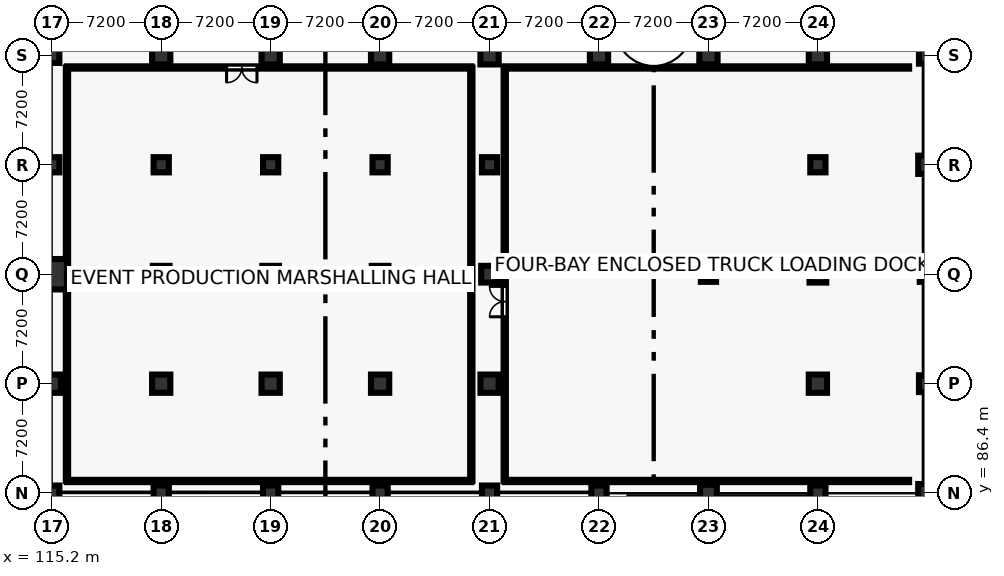
"""IFC4 building model, lengths in metres.
Left out: names, types, materials, properties, quantities, classifications, styles, units other than length and angle.
Written with IfcOpenShell. Run it as: python <this file> out.ifc"""

import sys

from ifc_helpers import new_model, si_unit, direction, frame, frame_2d, origin, origin_2d, place, context, subcontext, project, spatial, rectangle, circle, extrude, element, fill, save


model = new_model("IFC4")
c1 = context("Model", 3, precision=1e-05, world=origin(), true_north=direction((0.0, 1.0)))
c2 = subcontext(c1, "Body", "Model", "MODEL_VIEW")
j1 = project(units=[si_unit("LENGTHUNIT", "METRE"), si_unit("PLANEANGLEUNIT", "RADIAN")], contexts=[c1])
p1 = place(None, origin())
s1 = spatial("IfcSite", under=j1, at=p1, CompositionType="ELEMENT")
p2 = place(p1, origin())
s2 = spatial("IfcBuilding", under=s1, at=p2, CompositionType="ELEMENT")
p3 = place(p2, frame((0.0, 0.0, -5.4)))
s3 = spatial("IfcBuildingStorey", under=s2, at=p3, CompositionType="ELEMENT", Elevation=-5.4)
p4 = place(p3, frame((115.2, 86.4, 0.0), z_axis=(0.0, 0.0, 1.0), x_axis=(1.0, 0.0, 0.0)))
e1 = element("IfcColumn", 1, at=p4, inside=s3, PredefinedType="COLUMN", context=c2, shape_type="SweptSolid", body=[
    extrude(circle(Radius=0.5, at=origin_2d()), origin(), (0.0, 0.0, 1.0), 5.4),
])
p5 = place(p3, frame((115.2, 93.6, 0.0), z_axis=(0.0, 0.0, 1.0), x_axis=(1.0, 0.0, 0.0)))
e2 = element("IfcColumn", 2, at=p5, inside=s3, PredefinedType="COLUMN", context=c2, shape_type="SweptSolid", body=[
    extrude(circle(Radius=0.6, at=origin_2d()), origin(), (0.0, 0.0, 1.0), 5.4),
])
p6 = place(p3, frame((115.2, 100.8, 0.0), z_axis=(0.0, 0.0, 1.0), x_axis=(1.0, 0.0, 0.0)))
e3 = element("IfcColumn", 3, at=p6, inside=s3, PredefinedType="COLUMN", context=c2, shape_type="SweptSolid", body=[
    extrude(circle(Radius=1.0, at=origin_2d()), origin(), (0.0, 0.0, 1.0), 5.4),
])
p7 = place(p3, frame((115.2, 108.0, 0.0), z_axis=(0.0, 0.0, 1.0), x_axis=(1.0, 0.0, 0.0)))
e4 = element("IfcColumn", 4, at=p7, inside=s3, PredefinedType="COLUMN", context=c2, shape_type="SweptSolid", body=[
    extrude(rectangle(XDim=1.0, YDim=1.0, at=origin_2d()), origin(), (0.0, 0.0, 1.0), 5.4),
])
p8 = place(p3, frame((115.2, 115.2, 0.0), z_axis=(0.0, 0.0, 1.0), x_axis=(1.0, 0.0, 0.0)))
e5 = element("IfcColumn", 5, at=p8, inside=s3, PredefinedType="COLUMN", context=c2, shape_type="SweptSolid", body=[
    extrude(circle(Radius=0.5, at=origin_2d()), origin(), (0.0, 0.0, 1.0), 5.4),
])
p9 = place(p3, frame((122.4, 86.4, 0.0), z_axis=(0.0, 0.0, 1.0), x_axis=(1.0, 0.0, 0.0)))
e6 = element("IfcColumn", 6, at=p9, inside=s3, PredefinedType="COLUMN", context=c2, shape_type="SweptSolid", body=[
    extrude(rectangle(XDim=1.0, YDim=1.0, at=origin_2d()), origin(), (0.0, 0.0, 1.0), 5.4),
])
p10 = place(p3, frame((122.4, 93.6, 0.0), z_axis=(0.0, 0.0, 1.0), x_axis=(1.0, 0.0, 0.0)))
e7 = element("IfcColumn", 7, at=p10, inside=s3, PredefinedType="COLUMN", context=c2, shape_type="SweptSolid", body=[
    extrude(circle(Radius=0.6, at=origin_2d()), origin(), (0.0, 0.0, 1.0), 5.4),
])
p11 = place(p3, frame((122.4, 100.8, 0.0), z_axis=(0.0, 0.0, 1.0), x_axis=(1.0, 0.0, 0.0)))
e8 = element("IfcColumn", 8, at=p11, inside=s3, PredefinedType="COLUMN", context=c2, shape_type="SweptSolid", body=[
    extrude(rectangle(XDim=1.1, YDim=1.1, at=origin_2d()), origin(), (0.0, 0.0, 1.0), 5.4),
])
p12 = place(p3, frame((122.4, 108.0, 0.0), z_axis=(0.0, 0.0, 1.0), x_axis=(1.0, 0.0, 0.0)))
e9 = element("IfcColumn", 9, at=p12, inside=s3, PredefinedType="COLUMN", context=c2, shape_type="SweptSolid", body=[
    extrude(rectangle(XDim=1.0, YDim=1.0, at=origin_2d()), origin(), (0.0, 0.0, 1.0), 5.4),
])
p13 = place(p3, frame((122.4, 115.2, 0.0), z_axis=(0.0, 0.0, 1.0), x_axis=(1.0, 0.0, 0.0)))
e10 = element("IfcColumn", 10, at=p13, inside=s3, PredefinedType="COLUMN", context=c2, shape_type="SweptSolid", body=[
    extrude(circle(Radius=0.6, at=origin_2d()), origin(), (0.0, 0.0, 1.0), 5.4),
])
p14 = place(p3, frame((129.6, 86.4, 0.0), z_axis=(0.0, 0.0, 1.0), x_axis=(1.0, 0.0, 0.0)))
e11 = element("IfcColumn", 11, at=p14, inside=s3, PredefinedType="COLUMN", context=c2, shape_type="SweptSolid", body=[
    extrude(rectangle(XDim=1.0, YDim=1.0, at=origin_2d()), origin(), (0.0, 0.0, 1.0), 5.4),
])
p15 = place(p3, frame((129.6, 93.6, 0.0), z_axis=(0.0, 0.0, 1.0), x_axis=(1.0, 0.0, 0.0)))
e12 = element("IfcColumn", 12, at=p15, inside=s3, PredefinedType="COLUMN", context=c2, shape_type="SweptSolid", body=[
    extrude(circle(Radius=0.6, at=origin_2d()), origin(), (0.0, 0.0, 1.0), 5.4),
])
p16 = place(p3, frame((129.6, 100.8, 0.0), z_axis=(0.0, 0.0, 1.0), x_axis=(1.0, 0.0, 0.0)))
e13 = element("IfcColumn", 13, at=p16, inside=s3, PredefinedType="COLUMN", context=c2, shape_type="SweptSolid", body=[
    extrude(rectangle(XDim=1.1, YDim=1.1, at=origin_2d()), origin(), (0.0, 0.0, 1.0), 5.4),
])
p17 = place(p3, frame((129.6, 108.0, 0.0), z_axis=(0.0, 0.0, 1.0), x_axis=(1.0, 0.0, 0.0)))
e14 = element("IfcColumn", 14, at=p17, inside=s3, PredefinedType="COLUMN", context=c2, shape_type="SweptSolid", body=[
    extrude(rectangle(XDim=1.0, YDim=1.0, at=origin_2d()), origin(), (0.0, 0.0, 1.0), 5.4),
])
p18 = place(p3, frame((129.6, 115.2, 0.0), z_axis=(0.0, 0.0, 1.0), x_axis=(1.0, 0.0, 0.0)))
e15 = element("IfcColumn", 15, at=p18, inside=s3, PredefinedType="COLUMN", context=c2, shape_type="SweptSolid", body=[
    extrude(circle(Radius=0.6, at=origin_2d()), origin(), (0.0, 0.0, 1.0), 5.4),
])
p19 = place(p3, frame((136.8, 86.4, 0.0), z_axis=(0.0, 0.0, 1.0), x_axis=(1.0, 0.0, 0.0)))
e16 = element("IfcColumn", 16, at=p19, inside=s3, PredefinedType="COLUMN", context=c2, shape_type="SweptSolid", body=[
    extrude(rectangle(XDim=1.0, YDim=1.0, at=origin_2d()), origin(), (0.0, 0.0, 1.0), 5.4),
])
p20 = place(p3, frame((136.8, 93.6, 0.0), z_axis=(0.0, 0.0, 1.0), x_axis=(1.0, 0.0, 0.0)))
e17 = element("IfcColumn", 17, at=p20, inside=s3, PredefinedType="COLUMN", context=c2, shape_type="SweptSolid", body=[
    extrude(circle(Radius=0.6, at=origin_2d()), origin(), (0.0, 0.0, 1.0), 5.4),
])
p21 = place(p3, frame((136.8, 100.8, 0.0), z_axis=(0.0, 0.0, 1.0), x_axis=(1.0, 0.0, 0.0)))
e18 = element("IfcColumn", 18, at=p21, inside=s3, PredefinedType="COLUMN", context=c2, shape_type="SweptSolid", body=[
    extrude(rectangle(XDim=1.1, YDim=1.1, at=origin_2d()), origin(), (0.0, 0.0, 1.0), 5.4),
])
p22 = place(p3, frame((136.8, 108.0, 0.0), z_axis=(0.0, 0.0, 1.0), x_axis=(1.0, 0.0, 0.0)))
e19 = element("IfcColumn", 19, at=p22, inside=s3, PredefinedType="COLUMN", context=c2, shape_type="SweptSolid", body=[
    extrude(rectangle(XDim=1.0, YDim=1.0, at=origin_2d()), origin(), (0.0, 0.0, 1.0), 5.4),
])
p23 = place(p3, frame((136.8, 115.2, 0.0), z_axis=(0.0, 0.0, 1.0), x_axis=(1.0, 0.0, 0.0)))
e20 = element("IfcColumn", 20, at=p23, inside=s3, PredefinedType="COLUMN", context=c2, shape_type="SweptSolid", body=[
    extrude(circle(Radius=0.6, at=origin_2d()), origin(), (0.0, 0.0, 1.0), 5.4),
])
p24 = place(p3, frame((144.0, 86.4, 0.0), z_axis=(0.0, 0.0, 1.0), x_axis=(1.0, 0.0, 0.0)))
e21 = element("IfcColumn", 21, at=p24, inside=s3, PredefinedType="COLUMN", context=c2, shape_type="SweptSolid", body=[
    extrude(rectangle(XDim=1.0, YDim=1.0, at=origin_2d()), origin(), (0.0, 0.0, 1.0), 5.4),
])
p25 = place(p3, frame((144.0, 93.6, 0.0), z_axis=(0.0, 0.0, 1.0), x_axis=(1.0, 0.0, 0.0)))
e22 = element("IfcColumn", 22, at=p25, inside=s3, PredefinedType="COLUMN", context=c2, shape_type="SweptSolid", body=[
    extrude(circle(Radius=0.6, at=origin_2d()), origin(), (0.0, 0.0, 1.0), 5.4),
])
p26 = place(p3, frame((144.0, 100.8, 0.0), z_axis=(0.0, 0.0, 1.0), x_axis=(1.0, 0.0, 0.0)))
e23 = element("IfcColumn", 23, at=p26, inside=s3, PredefinedType="COLUMN", context=c2, shape_type="SweptSolid", body=[
    extrude(rectangle(XDim=1.1, YDim=1.1, at=origin_2d()), origin(), (0.0, 0.0, 1.0), 5.4),
])
p27 = place(p3, frame((144.0, 108.0, 0.0), z_axis=(0.0, 0.0, 1.0), x_axis=(1.0, 0.0, 0.0)))
e24 = element("IfcColumn", 24, at=p27, inside=s3, PredefinedType="COLUMN", context=c2, shape_type="SweptSolid", body=[
    extrude(rectangle(XDim=1.0, YDim=1.0, at=origin_2d()), origin(), (0.0, 0.0, 1.0), 5.4),
])
p28 = place(p3, frame((144.0, 115.2, 0.0), z_axis=(0.0, 0.0, 1.0), x_axis=(1.0, 0.0, 0.0)))
e25 = element("IfcColumn", 25, at=p28, inside=s3, PredefinedType="COLUMN", context=c2, shape_type="SweptSolid", body=[
    extrude(circle(Radius=0.6, at=origin_2d()), origin(), (0.0, 0.0, 1.0), 5.4),
])
p29 = place(p3, frame((151.2, 86.4, 0.0), z_axis=(0.0, 0.0, 1.0), x_axis=(1.0, 0.0, 0.0)))
e26 = element("IfcColumn", 26, at=p29, inside=s3, PredefinedType="COLUMN", context=c2, shape_type="SweptSolid", body=[
    extrude(rectangle(XDim=1.0, YDim=1.0, at=origin_2d()), origin(), (0.0, 0.0, 1.0), 5.4),
])
p30 = place(p3, frame((151.2, 115.2, 0.0), z_axis=(0.0, 0.0, 1.0), x_axis=(1.0, 0.0, 0.0)))
e27 = element("IfcColumn", 27, at=p30, inside=s3, PredefinedType="COLUMN", context=c2, shape_type="SweptSolid", body=[
    extrude(circle(Radius=0.6, at=origin_2d()), origin(), (0.0, 0.0, 1.0), 5.4),
])
p31 = place(p3, frame((158.4, 86.4, 0.0), z_axis=(0.0, 0.0, 1.0), x_axis=(1.0, 0.0, 0.0)))
e28 = element("IfcColumn", 28, at=p31, inside=s3, PredefinedType="COLUMN", context=c2, shape_type="SweptSolid", body=[
    extrude(rectangle(XDim=1.1, YDim=1.1, at=origin_2d()), origin(), (0.0, 0.0, 1.0), 5.4),
])
p32 = place(p3, frame((158.4, 100.8, 0.0), z_axis=(0.0, 0.0, 1.0), x_axis=(1.0, 0.0, 0.0)))
e29 = element("IfcColumn", 29, at=p32, inside=s3, PredefinedType="COLUMN", context=c2, shape_type="SweptSolid", body=[
    extrude(rectangle(XDim=1.0, YDim=1.0, at=origin_2d()), origin(), (0.0, 0.0, 1.0), 5.4),
])
p33 = place(p3, frame((158.4, 115.2, 0.0), z_axis=(0.0, 0.0, 1.0), x_axis=(1.0, 0.0, 0.0)))
e30 = element("IfcColumn", 30, at=p33, inside=s3, PredefinedType="COLUMN", context=c2, shape_type="SweptSolid", body=[
    extrude(circle(Radius=0.6, at=origin_2d()), origin(), (0.0, 0.0, 1.0), 5.4),
])
p34 = place(p3, frame((165.6, 86.4, 0.0), z_axis=(0.0, 0.0, 1.0), x_axis=(1.0, 0.0, 0.0)))
e31 = element("IfcColumn", 31, at=p34, inside=s3, PredefinedType="COLUMN", context=c2, shape_type="SweptSolid", body=[
    extrude(rectangle(XDim=1.0, YDim=1.0, at=origin_2d()), origin(), (0.0, 0.0, 1.0), 5.4),
])
p35 = place(p3, frame((165.6, 93.6, 0.0), z_axis=(0.0, 0.0, 1.0), x_axis=(1.0, 0.0, 0.0)))
e32 = element("IfcColumn", 32, at=p35, inside=s3, PredefinedType="COLUMN", context=c2, shape_type="SweptSolid", body=[
    extrude(circle(Radius=0.6, at=origin_2d()), origin(), (0.0, 0.0, 1.0), 5.4),
])
p36 = place(p3, frame((165.6, 100.8, 0.0), z_axis=(0.0, 0.0, 1.0), x_axis=(1.0, 0.0, 0.0)))
e33 = element("IfcColumn", 33, at=p36, inside=s3, PredefinedType="COLUMN", context=c2, shape_type="SweptSolid", body=[
    extrude(rectangle(XDim=1.1, YDim=1.1, at=origin_2d()), origin(), (0.0, 0.0, 1.0), 5.4),
])
p37 = place(p3, frame((165.6, 108.0, 0.0), z_axis=(0.0, 0.0, 1.0), x_axis=(1.0, 0.0, 0.0)))
e34 = element("IfcColumn", 34, at=p37, inside=s3, PredefinedType="COLUMN", context=c2, shape_type="SweptSolid", body=[
    extrude(rectangle(XDim=1.0, YDim=1.0, at=origin_2d()), origin(), (0.0, 0.0, 1.0), 5.4),
])
for number, where, z_axis, x_axis in (
    (35, (165.6, 115.2, 0.0), (0.0, 0.0, 1.0), (1.0, 0.0, 0.0)),
    (36, (172.8, 86.4, 0.0), (0.0, 0.0, 1.0), (1.0, 0.0, 0.0)),
):
    element("IfcColumn", number, at=place(p3, frame(where, z_axis=z_axis, x_axis=x_axis)), inside=s3, PredefinedType="COLUMN", context=c2, shape_type="SweptSolid", body=[
        extrude(circle(Radius=0.6, at=origin_2d()), origin(), (0.0, 0.0, 1.0), 5.4),
    ])
p38 = place(p3, frame((172.8, 93.6, 0.0), z_axis=(0.0, 0.0, 1.0), x_axis=(1.0, 0.0, 0.0)))
e37 = element("IfcColumn", 37, at=p38, inside=s3, PredefinedType="COLUMN", context=c2, shape_type="SweptSolid", body=[
    extrude(rectangle(XDim=1.1, YDim=1.1, at=origin_2d()), origin(), (0.0, 0.0, 1.0), 5.4),
])
p39 = place(p3, frame((172.8, 100.8, 0.0), z_axis=(0.0, 0.0, 1.0), x_axis=(1.0, 0.0, 0.0)))
e38 = element("IfcColumn", 38, at=p39, inside=s3, PredefinedType="COLUMN", context=c2, shape_type="SweptSolid", body=[
    extrude(rectangle(XDim=1.0, YDim=1.0, at=origin_2d()), origin(), (0.0, 0.0, 1.0), 5.4),
])
p40 = place(p3, frame((172.8, 108.0, 0.0), z_axis=(0.0, 0.0, 1.0), x_axis=(1.0, 0.0, 0.0)))
e39 = element("IfcColumn", 39, at=p40, inside=s3, PredefinedType="COLUMN", context=c2, shape_type="SweptSolid", body=[
    extrude(circle(Radius=0.6, at=origin_2d()), origin(), (0.0, 0.0, 1.0), 5.4),
])
p41 = place(p3, frame((172.8, 115.2, 0.0), z_axis=(0.0, 0.0, 1.0), x_axis=(1.0, 0.0, 0.0)))
e40 = element("IfcColumn", 40, at=p41, inside=s3, PredefinedType="COLUMN", context=c2, shape_type="SweptSolid", body=[
    extrude(rectangle(XDim=1.1, YDim=1.1, at=origin_2d()), origin(), (0.0, 0.0, 1.0), 5.4),
])
p42 = place(p3, frame((172.8, 43.2, 0.0), z_axis=(0.0, 0.0, 1.0), x_axis=(0.0, 1.0, 0.0)))
e41 = element("IfcWall", 41, at=p42, inside=s3, PredefinedType="USERDEFINED", context=c2, shape_type="SweptSolid", body=[
    extrude(rectangle(XDim=43.2, YDim=0.5, at=frame_2d((21.6, 0.0))), origin(), (0.0, 0.0, 1.0), 4.98),
])
p43 = place(p3, frame((172.8, 115.2, 0.0), z_axis=(0.0, 0.0, 1.0), x_axis=(0.0, 1.0, 0.0)))
e42 = element("IfcWall", 42, at=p43, inside=s3, PredefinedType="USERDEFINED", context=c2, shape_type="SweptSolid", body=[
    extrude(rectangle(XDim=14.4, YDim=0.5, at=frame_2d((7.2, 0.0))), origin(), (0.0, 0.0, 1.0), 4.98),
])
p44 = place(p3, frame((116.2, 87.2, 0.0), z_axis=(0.0, 0.0, 1.0), x_axis=(1.0, 0.0, 0.0)))
e43 = element("IfcWall", 43, at=p44, inside=s3, PredefinedType="PARTITIONING", context=c2, shape_type="SweptSolid", body=[
    extrude(rectangle(XDim=26.6, YDim=0.15, at=frame_2d((13.3, 0.0))), origin(), (0.0, 0.0, 1.0), 4.04),
])
p45 = place(p3, frame((142.8, 87.2, 0.0), z_axis=(0.0, 0.0, 1.0), x_axis=(0.0, 1.0, 0.0)))
e44 = element("IfcWall", 44, at=p45, inside=s3, PredefinedType="PARTITIONING", context=c2, shape_type="SweptSolid", body=[
    extrude(rectangle(XDim=27.2, YDim=0.15, at=frame_2d((13.6, 0.0))), origin(), (0.0, 0.0, 1.0), 4.04),
])
p46 = place(p3, frame((142.8, 114.4, 0.0), z_axis=(0.0, 0.0, 1.0), x_axis=(-1.0, 0.0, 0.0)))
e45 = element("IfcWall", 45, at=p46, inside=s3, PredefinedType="PARTITIONING", context=c2, shape_type="SweptSolid", body=[
    extrude(rectangle(XDim=26.6, YDim=0.15, at=frame_2d((13.3, 0.0))), origin(), (0.0, 0.0, 1.0), 4.04),
])
p47 = place(p46, frame((14.1, 0.0, 0.0)))
e46 = element("IfcOpeningElement", 46, at=p47, cuts=e45, PredefinedType="OPENING", context=c2, shape_type="SweptSolid", body=[
    extrude(rectangle(XDim=2.0, YDim=2.4, at=frame_2d((1.0, 1.2))), frame((0.0, 0.085, 0.0), z_axis=(0.0, -1.0, 0.0), x_axis=(1.0, 0.0, 0.0)), (0.0, 0.0, 1.0), 0.17),
])
p48 = place(p3, frame((116.2, 114.4, 0.0), z_axis=(0.0, 0.0, 1.0), x_axis=(0.0, -1.0, 0.0)))
e47 = element("IfcWall", 47, at=p48, inside=s3, PredefinedType="PARTITIONING", context=c2, shape_type="SweptSolid", body=[
    extrude(rectangle(XDim=27.2, YDim=0.15, at=frame_2d((13.6, 0.0))), origin(), (0.0, 0.0, 1.0), 4.04),
])
for number, where, z_axis, x_axis in (
    (48, (145.0, 87.2, 0.0), (0.0, 0.0, 1.0), (1.0, 0.0, 0.0)),
    (49, (171.6, 114.4, 0.0), (0.0, 0.0, 1.0), (-1.0, 0.0, 0.0)),
):
    element("IfcWall", number, at=place(p3, frame(where, z_axis=z_axis, x_axis=x_axis)), inside=s3, PredefinedType="PARTITIONING", context=c2, shape_type="SweptSolid", body=[
        extrude(rectangle(XDim=26.6, YDim=0.15, at=frame_2d((13.3, 0.0))), origin(), (0.0, 0.0, 1.0), 4.04),
    ])
p49 = place(p3, frame((145.0, 114.4, 0.0), z_axis=(0.0, 0.0, 1.0), x_axis=(0.0, -1.0, 0.0)))
e50 = element("IfcWall", 50, at=p49, inside=s3, PredefinedType="PARTITIONING", context=c2, shape_type="SweptSolid", body=[
    extrude(rectangle(XDim=27.2, YDim=0.15, at=frame_2d((13.6, 0.0))), origin(), (0.0, 0.0, 1.0), 4.04),
])
p50 = place(p49, frame((14.4, 0.0, 0.0)))
e51 = element("IfcOpeningElement", 51, at=p50, cuts=e50, PredefinedType="OPENING", context=c2, shape_type="SweptSolid", body=[
    extrude(rectangle(XDim=2.0, YDim=2.4, at=frame_2d((1.0, 1.2))), frame((0.0, 0.085, 0.0), z_axis=(0.0, -1.0, 0.0), x_axis=(1.0, 0.0, 0.0)), (0.0, 0.0, 1.0), 0.17),
])
p51 = place(p47, origin())
e52 = element("IfcDoor", 52, at=p51, inside=s3, OperationType="DOUBLE_DOOR_SINGLE_SWING", PredefinedType="DOOR", context=c2, shape_type="SweptSolid", body=[
    extrude(rectangle(XDim=2.0, YDim=2.4, at=frame_2d((1.0, 1.2))), frame((0.0, 0.025, 0.0), z_axis=(0.0, -1.0, 0.0), x_axis=(1.0, 0.0, 0.0)), (0.0, 0.0, 1.0), 0.05),
])
fill(e46, e52)
p52 = place(p50, frame((2.0, 0.0, 0.0), z_axis=(0.0, 0.0, 1.0), x_axis=(-1.0, 0.0, 0.0)))
e53 = element("IfcDoor", 53, at=p52, inside=s3, OperationType="DOUBLE_DOOR_SINGLE_SWING", PredefinedType="DOOR", context=c2, shape_type="SweptSolid", body=[
    extrude(rectangle(XDim=2.0, YDim=2.4, at=frame_2d((1.0, 1.2))), frame((0.0, 0.025, 0.0), z_axis=(0.0, -1.0, 0.0), x_axis=(1.0, 0.0, 0.0)), (0.0, 0.0, 1.0), 0.05),
])
fill(e51, e53)
save(model, sys.argv[1])
